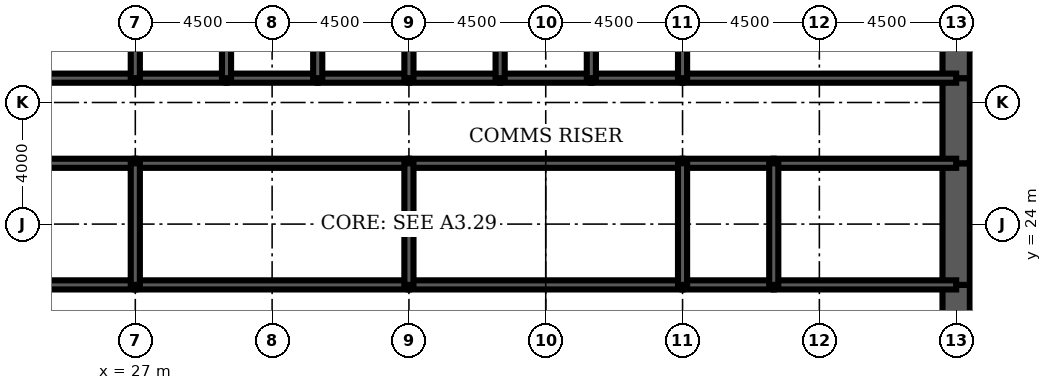
"""IFC4 building model, lengths in metres.
Left out: names, types, materials, properties, quantities, classifications, styles, units other than length and angle.
Written with IfcOpenShell. Run it as: python <this file> out.ifc"""

import sys

from ifc_helpers import new_model, si_unit, direction, frame, frame_2d, origin, place, context, subcontext, project, spatial, rectangle, extrude, element, fill, save


model = new_model("IFC4")
c1 = context("Model", 3, precision=1e-05, world=origin(), true_north=direction((0.0, 1.0)))
c2 = subcontext(c1, "Body", "Model", "MODEL_VIEW")
j1 = project(units=[si_unit("LENGTHUNIT", "METRE"), si_unit("PLANEANGLEUNIT", "RADIAN")], contexts=[c1])
p1 = place(None, origin())
s1 = spatial("IfcSite", under=j1, at=p1, CompositionType="ELEMENT")
p2 = place(p1, origin())
s2 = spatial("IfcBuilding", under=s1, at=p2, CompositionType="ELEMENT")
p3 = place(p2, frame((0.0, 0.0, 125.7)))
s3 = spatial("IfcBuildingStorey", under=s2, at=p3, CompositionType="ELEMENT", Elevation=125.7)
p4 = place(p3, frame((54.0, 19.2, 0.0), z_axis=(0.0, 0.0, 1.0), x_axis=(0.0, 1.0, 0.0)))
e1 = element("IfcWall", 1, at=p4, inside=s3, PredefinedType="SHEAR", context=c2, shape_type="SweptSolid", body=[
    extrude(rectangle(XDim=2.8, YDim=0.9, at=frame_2d((1.4, 0.0))), origin(), (0.0, 0.0, 1.0), 4.2),
])
p5 = place(p4, frame((0.4, 0.0, 0.0)))
e2 = element("IfcOpeningElement", 2, at=p5, cuts=e1, PredefinedType="OPENING", context=c2, shape_type="SweptSolid", body=[
    extrude(rectangle(XDim=1.8, YDim=2.1, at=frame_2d((0.9, 1.05))), frame((0.0, 0.46, 0.0), z_axis=(0.0, -1.0, 0.0), x_axis=(1.0, 0.0, 0.0)), (0.0, 0.0, 1.0), 0.92),
])
p6 = place(p3, frame((54.0, 22.0, 0.0), z_axis=(0.0, 0.0, 1.0), x_axis=(0.0, 1.0, 0.0)))
e3 = element("IfcWall", 3, at=p6, inside=s3, PredefinedType="SHEAR", context=c2, shape_type="SweptSolid", body=[
    extrude(rectangle(XDim=4.0, YDim=0.9, at=frame_2d((2.0, 0.0))), origin(), (0.0, 0.0, 1.0), 4.2),
])
p7 = place(p3, frame((54.0, 26.0, 0.0), z_axis=(0.0, 0.0, 1.0), x_axis=(0.0, 1.0, 0.0)))
e4 = element("IfcWall", 4, at=p7, inside=s3, PredefinedType="SHEAR", context=c2, shape_type="SweptSolid", body=[
    extrude(rectangle(XDim=2.8, YDim=0.9, at=frame_2d((1.4, 0.0))), origin(), (0.0, 0.0, 1.0), 4.2),
])
p8 = place(p7, frame((0.6, 0.0, 0.0)))
e5 = element("IfcOpeningElement", 5, at=p8, cuts=e4, PredefinedType="OPENING", context=c2, shape_type="SweptSolid", body=[
    extrude(rectangle(XDim=1.8, YDim=2.1, at=frame_2d((0.9, 1.05))), frame((0.0, 0.46, 0.0), z_axis=(0.0, -1.0, 0.0), x_axis=(1.0, 0.0, 0.0)), (0.0, 0.0, 1.0), 0.92),
])
p9 = place(p3, frame((54.0, 28.8, 0.0), z_axis=(0.0, 0.0, 1.0), x_axis=(0.0, 1.0, 0.0)))
e6 = element("IfcWall", 6, at=p9, inside=s3, PredefinedType="SHEAR", context=c2, shape_type="SweptSolid", body=[
    extrude(rectangle(XDim=3.2, YDim=0.9, at=frame_2d((1.6, 0.0))), origin(), (0.0, 0.0, 1.0), 4.2),
])
p10 = place(p3, frame((18.0, 28.8, 0.0), z_axis=(0.0, 0.0, 1.0), x_axis=(1.0, 0.0, 0.0)))
e7 = element("IfcWall", 7, at=p10, inside=s3, PredefinedType="SOLIDWALL", context=c2, shape_type="SweptSolid", body=[
    extrude(rectangle(XDim=9.0, YDim=0.3, at=frame_2d((4.5, 0.0))), origin(), (0.0, 0.0, 1.0), 4.2),
])
p11 = place(p10, frame((0.65, 0.0, 0.0)))
e8 = element("IfcOpeningElement", 8, at=p11, cuts=e7, PredefinedType="OPENING", context=c2, shape_type="SweptSolid", body=[
    extrude(rectangle(XDim=1.0, YDim=2.1, at=frame_2d((0.5, 1.05))), frame((0.0, 0.16, 0.0), z_axis=(0.0, -1.0, 0.0), x_axis=(1.0, 0.0, 0.0)), (0.0, 0.0, 1.0), 0.32),
])
p12 = place(p3, frame((27.0, 28.8, 0.0), z_axis=(0.0, 0.0, 1.0), x_axis=(1.0, 0.0, 0.0)))
e9 = element("IfcWall", 9, at=p12, inside=s3, PredefinedType="SOLIDWALL", context=c2, shape_type="SweptSolid", body=[
    extrude(rectangle(XDim=3.0, YDim=0.3, at=frame_2d((1.5, 0.0))), origin(), (0.0, 0.0, 1.0), 4.2),
])
p13 = place(p12, frame((0.95, 0.0, 0.0)))
e10 = element("IfcOpeningElement", 10, at=p13, cuts=e9, PredefinedType="OPENING", context=c2, shape_type="SweptSolid", body=[
    extrude(rectangle(XDim=1.1, YDim=2.2, at=frame_2d((0.55, 1.1))), frame((0.0, 0.16, 0.0), z_axis=(0.0, -1.0, 0.0), x_axis=(1.0, 0.0, 0.0)), (0.0, 0.0, 1.0), 0.32),
])
p14 = place(p3, frame((30.0, 28.8, 0.0), z_axis=(0.0, 0.0, 1.0), x_axis=(1.0, 0.0, 0.0)))
e11 = element("IfcWall", 11, at=p14, inside=s3, PredefinedType="SOLIDWALL", context=c2, shape_type="SweptSolid", body=[
    extrude(rectangle(XDim=3.0, YDim=0.3, at=frame_2d((1.5, 0.0))), origin(), (0.0, 0.0, 1.0), 4.2),
])
p15 = place(p14, frame((0.95, 0.0, 0.0)))
e12 = element("IfcOpeningElement", 12, at=p15, cuts=e11, PredefinedType="OPENING", context=c2, shape_type="SweptSolid", body=[
    extrude(rectangle(XDim=1.1, YDim=2.2, at=frame_2d((0.55, 1.1))), frame((0.0, 0.16, 0.0), z_axis=(0.0, -1.0, 0.0), x_axis=(1.0, 0.0, 0.0)), (0.0, 0.0, 1.0), 0.32),
])
p16 = place(p3, frame((33.0, 28.8, 0.0), z_axis=(0.0, 0.0, 1.0), x_axis=(1.0, 0.0, 0.0)))
e13 = element("IfcWall", 13, at=p16, inside=s3, PredefinedType="SOLIDWALL", context=c2, shape_type="SweptSolid", body=[
    extrude(rectangle(XDim=3.0, YDim=0.3, at=frame_2d((1.5, 0.0))), origin(), (0.0, 0.0, 1.0), 4.2),
])
p17 = place(p16, frame((0.95, 0.0, 0.0)))
e14 = element("IfcOpeningElement", 14, at=p17, cuts=e13, PredefinedType="OPENING", context=c2, shape_type="SweptSolid", body=[
    extrude(rectangle(XDim=1.1, YDim=2.2, at=frame_2d((0.55, 1.1))), frame((0.0, 0.16, 0.0), z_axis=(0.0, -1.0, 0.0), x_axis=(1.0, 0.0, 0.0)), (0.0, 0.0, 1.0), 0.32),
])
for number, where, z_axis, x_axis in (
    (15, (36.0, 28.8, 0.0), (0.0, 0.0, 1.0), (1.0, 0.0, 0.0)),
    (16, (39.0, 28.8, 0.0), (0.0, 0.0, 1.0), (1.0, 0.0, 0.0)),
):
    element("IfcWall", number, at=place(p3, frame(where, z_axis=z_axis, x_axis=x_axis)), inside=s3, PredefinedType="SOLIDWALL", context=c2, shape_type="SweptSolid", body=[
        extrude(rectangle(XDim=3.0, YDim=0.3, at=frame_2d((1.5, 0.0))), origin(), (0.0, 0.0, 1.0), 4.2),
    ])
p18 = place(p3, frame((42.0, 28.8, 0.0), z_axis=(0.0, 0.0, 1.0), x_axis=(1.0, 0.0, 0.0)))
e17 = element("IfcWall", 17, at=p18, inside=s3, PredefinedType="SOLIDWALL", context=c2, shape_type="SweptSolid", body=[
    extrude(rectangle(XDim=3.0, YDim=0.3, at=frame_2d((1.5, 0.0))), origin(), (0.0, 0.0, 1.0), 4.2),
])
p19 = place(p18, frame((0.95, 0.0, 0.0)))
e18 = element("IfcOpeningElement", 18, at=p19, cuts=e17, PredefinedType="OPENING", context=c2, shape_type="SweptSolid", body=[
    extrude(rectangle(XDim=1.1, YDim=2.2, at=frame_2d((0.55, 1.1))), frame((0.0, 0.16, 0.0), z_axis=(0.0, -1.0, 0.0), x_axis=(1.0, 0.0, 0.0)), (0.0, 0.0, 1.0), 0.32),
])
p20 = place(p3, frame((45.0, 28.8, 0.0), z_axis=(0.0, 0.0, 1.0), x_axis=(1.0, 0.0, 0.0)))
e19 = element("IfcWall", 19, at=p20, inside=s3, PredefinedType="SOLIDWALL", context=c2, shape_type="SweptSolid", body=[
    extrude(rectangle(XDim=9.0, YDim=0.3, at=frame_2d((4.5, 0.0))), origin(), (0.0, 0.0, 1.0), 4.2),
])
p21 = place(p20, frame((7.35, 0.0, 0.0)))
e20 = element("IfcOpeningElement", 20, at=p21, cuts=e19, PredefinedType="OPENING", context=c2, shape_type="SweptSolid", body=[
    extrude(rectangle(XDim=1.0, YDim=2.1, at=frame_2d((0.5, 1.05))), frame((0.0, 0.16, 0.0), z_axis=(0.0, -1.0, 0.0), x_axis=(1.0, 0.0, 0.0)), (0.0, 0.0, 1.0), 0.32),
])
p22 = place(p3, frame((24.0, 22.0, 0.0), z_axis=(0.0, 0.0, 1.0), x_axis=(1.0, 0.0, 0.0)))
e21 = element("IfcWall", 21, at=p22, inside=s3, PredefinedType="SOLIDWALL", context=c2, shape_type="SweptSolid", body=[
    extrude(rectangle(XDim=3.0, YDim=0.3, at=frame_2d((1.5, 0.0))), origin(), (0.0, 0.0, 1.0), 4.2),
])
p23 = place(p22, frame((1.0, 0.0, 0.0)))
e22 = element("IfcOpeningElement", 22, at=p23, cuts=e21, PredefinedType="OPENING", context=c2, shape_type="SweptSolid", body=[
    extrude(rectangle(XDim=1.0, YDim=2.1, at=frame_2d((0.5, 1.05))), frame((0.0, 0.16, 0.0), z_axis=(0.0, -1.0, 0.0), x_axis=(1.0, 0.0, 0.0)), (0.0, 0.0, 1.0), 0.32),
])
p24 = place(p3, frame((27.0, 22.0, 0.0), z_axis=(0.0, 0.0, 1.0), x_axis=(1.0, 0.0, 0.0)))
e23 = element("IfcWall", 23, at=p24, inside=s3, PredefinedType="SOLIDWALL", context=c2, shape_type="SweptSolid", body=[
    extrude(rectangle(XDim=9.0, YDim=0.3, at=frame_2d((4.5, 0.0))), origin(), (0.0, 0.0, 1.0), 4.2),
])
p25 = place(p24, frame((4.0, 0.0, 0.0)))
e24 = element("IfcOpeningElement", 24, at=p25, cuts=e23, PredefinedType="OPENING", context=c2, shape_type="SweptSolid", body=[
    extrude(rectangle(XDim=1.0, YDim=2.1, at=frame_2d((0.5, 1.05))), frame((0.0, 0.16, 0.0), z_axis=(0.0, -1.0, 0.0), x_axis=(1.0, 0.0, 0.0)), (0.0, 0.0, 1.0), 0.32),
])
p26 = place(p3, frame((36.0, 22.0, 0.0), z_axis=(0.0, 0.0, 1.0), x_axis=(1.0, 0.0, 0.0)))
e25 = element("IfcWall", 25, at=p26, inside=s3, PredefinedType="SOLIDWALL", context=c2, shape_type="SweptSolid", body=[
    extrude(rectangle(XDim=9.0, YDim=0.3, at=frame_2d((4.5, 0.0))), origin(), (0.0, 0.0, 1.0), 4.2),
])
p27 = place(p26, frame((4.0, 0.0, 0.0)))
e26 = element("IfcOpeningElement", 26, at=p27, cuts=e25, PredefinedType="OPENING", context=c2, shape_type="SweptSolid", body=[
    extrude(rectangle(XDim=1.0, YDim=2.1, at=frame_2d((0.5, 1.05))), frame((0.0, 0.16, 0.0), z_axis=(0.0, -1.0, 0.0), x_axis=(1.0, 0.0, 0.0)), (0.0, 0.0, 1.0), 0.32),
])
p28 = place(p3, frame((45.0, 22.0, 0.0), z_axis=(0.0, 0.0, 1.0), x_axis=(1.0, 0.0, 0.0)))
e27 = element("IfcWall", 27, at=p28, inside=s3, PredefinedType="SOLIDWALL", context=c2, shape_type="SweptSolid", body=[
    extrude(rectangle(XDim=3.0, YDim=0.3, at=frame_2d((1.5, 0.0))), origin(), (0.0, 0.0, 1.0), 4.2),
])
p29 = place(p28, frame((1.0, 0.0, 0.0)))
e28 = element("IfcOpeningElement", 28, at=p29, cuts=e27, PredefinedType="OPENING", context=c2, shape_type="SweptSolid", body=[
    extrude(rectangle(XDim=1.0, YDim=2.1, at=frame_2d((0.5, 1.05))), frame((0.0, 0.16, 0.0), z_axis=(0.0, -1.0, 0.0), x_axis=(1.0, 0.0, 0.0)), (0.0, 0.0, 1.0), 0.32),
])
p30 = place(p3, frame((48.0, 22.0, 0.0), z_axis=(0.0, 0.0, 1.0), x_axis=(1.0, 0.0, 0.0)))
e29 = element("IfcWall", 29, at=p30, inside=s3, PredefinedType="SOLIDWALL", context=c2, shape_type="SweptSolid", body=[
    extrude(rectangle(XDim=6.0, YDim=0.3, at=frame_2d((3.0, 0.0))), origin(), (0.0, 0.0, 1.0), 4.2),
])
p31 = place(p30, frame((2.0, 0.0, 0.0)))
e30 = element("IfcOpeningElement", 30, at=p31, cuts=e29, PredefinedType="OPENING", context=c2, shape_type="SweptSolid", body=[
    extrude(rectangle(XDim=1.0, YDim=2.1, at=frame_2d((0.5, 1.05))), frame((0.0, 0.16, 0.0), z_axis=(0.0, -1.0, 0.0), x_axis=(1.0, 0.0, 0.0)), (0.0, 0.0, 1.0), 0.32),
])
p32 = place(p30, frame((4.3, 0.0, 0.0)))
e31 = element("IfcOpeningElement", 31, at=p32, cuts=e29, PredefinedType="OPENING", context=c2, shape_type="SweptSolid", body=[
    extrude(rectangle(XDim=1.0, YDim=2.1, at=frame_2d((0.5, 1.05))), frame((0.0, 0.16, 0.0), z_axis=(0.0, -1.0, 0.0), x_axis=(1.0, 0.0, 0.0)), (0.0, 0.0, 1.0), 0.32),
])
p33 = place(p3, frame((24.0, 26.0, 0.0), z_axis=(0.0, 0.0, 1.0), x_axis=(1.0, 0.0, 0.0)))
e32 = element("IfcWall", 32, at=p33, inside=s3, PredefinedType="SOLIDWALL", context=c2, shape_type="SweptSolid", body=[
    extrude(rectangle(XDim=3.0, YDim=0.3, at=frame_2d((1.5, 0.0))), origin(), (0.0, 0.0, 1.0), 4.2),
])
for number, where, z_axis, x_axis in (
    (33, (27.0, 26.0, 0.0), (0.0, 0.0, 1.0), (1.0, 0.0, 0.0)),
    (34, (36.0, 26.0, 0.0), (0.0, 0.0, 1.0), (1.0, 0.0, 0.0)),
):
    element("IfcWall", number, at=place(p3, frame(where, z_axis=z_axis, x_axis=x_axis)), inside=s3, PredefinedType="SOLIDWALL", context=c2, shape_type="SweptSolid", body=[
        extrude(rectangle(XDim=9.0, YDim=0.3, at=frame_2d((4.5, 0.0))), origin(), (0.0, 0.0, 1.0), 4.2),
    ])
p34 = place(p3, frame((45.0, 26.0, 0.0), z_axis=(0.0, 0.0, 1.0), x_axis=(1.0, 0.0, 0.0)))
e35 = element("IfcWall", 35, at=p34, inside=s3, PredefinedType="SOLIDWALL", context=c2, shape_type="SweptSolid", body=[
    extrude(rectangle(XDim=3.0, YDim=0.3, at=frame_2d((1.5, 0.0))), origin(), (0.0, 0.0, 1.0), 4.2),
])
p35 = place(p3, frame((48.0, 26.0, 0.0), z_axis=(0.0, 0.0, 1.0), x_axis=(1.0, 0.0, 0.0)))
e36 = element("IfcWall", 36, at=p35, inside=s3, PredefinedType="SOLIDWALL", context=c2, shape_type="SweptSolid", body=[
    extrude(rectangle(XDim=6.0, YDim=0.3, at=frame_2d((3.0, 0.0))), origin(), (0.0, 0.0, 1.0), 4.2),
])
for number, where, z_axis, x_axis in (
    (37, (27.0, 28.8, 0.0), (0.0, 0.0, 1.0), (0.0, 1.0, 0.0)),
    (38, (30.0, 28.8, 0.0), (0.0, 0.0, 1.0), (0.0, 1.0, 0.0)),
    (39, (33.0, 28.8, 0.0), (0.0, 0.0, 1.0), (0.0, 1.0, 0.0)),
    (40, (36.0, 28.8, 0.0), (0.0, 0.0, 1.0), (0.0, 1.0, 0.0)),
    (41, (39.0, 28.8, 0.0), (0.0, 0.0, 1.0), (0.0, 1.0, 0.0)),
    (42, (42.0, 28.8, 0.0), (0.0, 0.0, 1.0), (0.0, 1.0, 0.0)),
    (43, (45.0, 28.8, 0.0), (0.0, 0.0, 1.0), (0.0, 1.0, 0.0)),
):
    element("IfcWall", number, at=place(p3, frame(where, z_axis=z_axis, x_axis=x_axis)), inside=s3, PredefinedType="SOLIDWALL", context=c2, shape_type="SweptSolid", body=[
        extrude(rectangle(XDim=3.2, YDim=0.3, at=frame_2d((1.6, 0.0))), origin(), (0.0, 0.0, 1.0), 4.2),
    ])
for number, where, z_axis, x_axis in (
    (44, (27.0, 22.0, 0.0), (0.0, 0.0, 1.0), (0.0, 1.0, 0.0)),
    (45, (36.0, 22.0, 0.0), (0.0, 0.0, 1.0), (0.0, 1.0, 0.0)),
    (46, (45.0, 22.0, 0.0), (0.0, 0.0, 1.0), (0.0, 1.0, 0.0)),
    (47, (48.0, 22.0, 0.0), (0.0, 0.0, 1.0), (0.0, 1.0, 0.0)),
):
    element("IfcWall", number, at=place(p3, frame(where, z_axis=z_axis, x_axis=x_axis)), inside=s3, PredefinedType="SOLIDWALL", context=c2, shape_type="SweptSolid", body=[
        extrude(rectangle(XDim=4.0, YDim=0.3, at=frame_2d((2.0, 0.0))), origin(), (0.0, 0.0, 1.0), 4.2),
    ])
p36 = place(p3, frame((42.5, 22.15, 0.0), z_axis=(0.0, 0.0, 1.0), x_axis=(0.0, 1.0, 0.0)))
e48 = element("IfcWall", 48, at=p36, inside=s3, PredefinedType="PARTITIONING", context=c2, shape_type="SweptSolid", body=[
    extrude(rectangle(XDim=3.7, YDim=0.15, at=frame_2d((1.85, 0.0))), origin(), (0.0, 0.0, 1.0), 3.0),
])
p37 = place(p36, frame((2.2, 0.0, 0.0)))
e49 = element("IfcOpeningElement", 49, at=p37, cuts=e48, PredefinedType="OPENING", context=c2, shape_type="SweptSolid", body=[
    extrude(rectangle(XDim=1.0, YDim=2.1, at=frame_2d((0.5, 1.05))), frame((0.0, 0.085, 0.0), z_axis=(0.0, -1.0, 0.0), x_axis=(1.0, 0.0, 0.0)), (0.0, 0.0, 1.0), 0.17),
])
p38 = place(p3, frame((51.975, 22.15, 0.0), z_axis=(0.0, 0.0, 1.0), x_axis=(0.0, 1.0, 0.0)))
e50 = element("IfcWall", 50, at=p38, inside=s3, PredefinedType="PARTITIONING", context=c2, shape_type="SweptSolid", body=[
    extrude(rectangle(XDim=3.7, YDim=0.15, at=frame_2d((1.85, 0.0))), origin(), (0.0, 0.0, 1.0), 3.0),
])
p39 = place(p3, frame((25.2, 26.15, 0.0), z_axis=(0.0, 0.0, 1.0), x_axis=(0.0, 1.0, 0.0)))
e51 = element("IfcWall", 51, at=p39, inside=s3, PredefinedType="PARTITIONING", context=c2, shape_type="SweptSolid", body=[
    extrude(rectangle(XDim=2.5, YDim=0.15, at=frame_2d((1.25, 0.0))), origin(), (0.0, 0.0, 1.0), 3.0),
])
p40 = place(p39, frame((0.35, 0.0, 0.0)))
e52 = element("IfcOpeningElement", 52, at=p40, cuts=e51, PredefinedType="OPENING", context=c2, shape_type="SweptSolid", body=[
    extrude(rectangle(XDim=1.0, YDim=2.1, at=frame_2d((0.5, 1.05))), frame((0.0, 0.085, 0.0), z_axis=(0.0, -1.0, 0.0), x_axis=(1.0, 0.0, 0.0)), (0.0, 0.0, 1.0), 0.17),
])
p41 = place(p37, origin())
e53 = element("IfcDoor", 53, at=p41, inside=s3, OperationType="SINGLE_SWING_RIGHT", PredefinedType="DOOR", context=c2, shape_type="SweptSolid", body=[
    extrude(rectangle(XDim=1.0, YDim=2.1, at=frame_2d((0.5, 1.05))), frame((0.0, 0.025, 0.0), z_axis=(0.0, -1.0, 0.0), x_axis=(1.0, 0.0, 0.0)), (0.0, 0.0, 1.0), 0.05),
])
fill(e49, e53)
p42 = place(p40, origin())
e54 = element("IfcDoor", 54, at=p42, inside=s3, OperationType="SINGLE_SWING_LEFT", PredefinedType="DOOR", context=c2, shape_type="SweptSolid", body=[
    extrude(rectangle(XDim=1.0, YDim=2.1, at=frame_2d((0.5, 1.05))), frame((0.0, 0.025, 0.0), z_axis=(0.0, -1.0, 0.0), x_axis=(1.0, 0.0, 0.0)), (0.0, 0.0, 1.0), 0.05),
])
fill(e52, e54)
p43 = place(p19, origin())
e55 = element("IfcDoor", 55, at=p43, inside=s3, OperationType="DOUBLE_DOOR_SLIDING", PredefinedType="USERDEFINED", context=c2, shape_type="SweptSolid", body=[
    extrude(rectangle(XDim=1.1, YDim=2.2, at=frame_2d((0.55, 1.1))), frame((0.0, 0.025, 0.0), z_axis=(0.0, -1.0, 0.0), x_axis=(1.0, 0.0, 0.0)), (0.0, 0.0, 1.0), 0.05),
])
fill(e18, e55)
p44 = place(p13, origin())
e56 = element("IfcDoor", 56, at=p44, inside=s3, OperationType="DOUBLE_DOOR_SLIDING", PredefinedType="USERDEFINED", context=c2, shape_type="SweptSolid", body=[
    extrude(rectangle(XDim=1.1, YDim=2.2, at=frame_2d((0.55, 1.1))), frame((0.0, 0.025, 0.0), z_axis=(0.0, -1.0, 0.0), x_axis=(1.0, 0.0, 0.0)), (0.0, 0.0, 1.0), 0.05),
])
fill(e10, e56)
p45 = place(p15, origin())
e57 = element("IfcDoor", 57, at=p45, inside=s3, OperationType="DOUBLE_DOOR_SLIDING", PredefinedType="USERDEFINED", context=c2, shape_type="SweptSolid", body=[
    extrude(rectangle(XDim=1.1, YDim=2.2, at=frame_2d((0.55, 1.1))), frame((0.0, 0.025, 0.0), z_axis=(0.0, -1.0, 0.0), x_axis=(1.0, 0.0, 0.0)), (0.0, 0.0, 1.0), 0.05),
])
fill(e12, e57)
p46 = place(p17, origin())
e58 = element("IfcDoor", 58, at=p46, inside=s3, OperationType="DOUBLE_DOOR_SLIDING", PredefinedType="USERDEFINED", context=c2, shape_type="SweptSolid", body=[
    extrude(rectangle(XDim=1.1, YDim=2.2, at=frame_2d((0.55, 1.1))), frame((0.0, 0.025, 0.0), z_axis=(0.0, -1.0, 0.0), x_axis=(1.0, 0.0, 0.0)), (0.0, 0.0, 1.0), 0.05),
])
fill(e14, e58)
p47 = place(p21, origin())
e59 = element("IfcDoor", 59, at=p47, inside=s3, OperationType="SINGLE_SWING_RIGHT", PredefinedType="DOOR", context=c2, shape_type="SweptSolid", body=[
    extrude(rectangle(XDim=1.0, YDim=2.1, at=frame_2d((0.5, 1.05))), frame((0.0, 0.025, 0.0), z_axis=(0.0, -1.0, 0.0), x_axis=(1.0, 0.0, 0.0)), (0.0, 0.0, 1.0), 0.05),
])
fill(e20, e59)
p48 = place(p5, origin())
e60 = element("IfcDoor", 60, at=p48, inside=s3, OperationType="SINGLE_SWING_LEFT", PredefinedType="DOOR", context=c2, shape_type="SweptSolid", body=[
    extrude(rectangle(XDim=1.8, YDim=2.1, at=frame_2d((0.9, 1.05))), frame((0.0, 0.45, 0.0), z_axis=(0.0, -1.0, 0.0), x_axis=(1.0, 0.0, 0.0)), (0.0, 0.0, 1.0), 0.899),
])
fill(e2, e60)
p49 = place(p8, origin())
e61 = element("IfcDoor", 61, at=p49, inside=s3, OperationType="SINGLE_SWING_LEFT", PredefinedType="DOOR", context=c2, shape_type="SweptSolid", body=[
    extrude(rectangle(XDim=1.8, YDim=2.1, at=frame_2d((0.9, 1.05))), frame((0.0, 0.45, 0.0), z_axis=(0.0, -1.0, 0.0), x_axis=(1.0, 0.0, 0.0)), (0.0, 0.0, 1.0), 0.899),
])
fill(e5, e61)
p50 = place(p23, origin())
e62 = element("IfcDoor", 62, at=p50, inside=s3, OperationType="SINGLE_SWING_LEFT", PredefinedType="DOOR", context=c2, shape_type="SweptSolid", body=[
    extrude(rectangle(XDim=1.0, YDim=2.1, at=frame_2d((0.5, 1.05))), frame((0.0, 0.025, 0.0), z_axis=(0.0, -1.0, 0.0), x_axis=(1.0, 0.0, 0.0)), (0.0, 0.0, 1.0), 0.05),
])
fill(e22, e62)
p51 = place(p25, origin())
e63 = element("IfcDoor", 63, at=p51, inside=s3, OperationType="SINGLE_SWING_LEFT", PredefinedType="DOOR", context=c2, shape_type="SweptSolid", body=[
    extrude(rectangle(XDim=1.0, YDim=2.1, at=frame_2d((0.5, 1.05))), frame((0.0, 0.025, 0.0), z_axis=(0.0, -1.0, 0.0), x_axis=(1.0, 0.0, 0.0)), (0.0, 0.0, 1.0), 0.05),
])
fill(e24, e63)
p52 = place(p27, origin())
e64 = element("IfcDoor", 64, at=p52, inside=s3, OperationType="SINGLE_SWING_LEFT", PredefinedType="DOOR", context=c2, shape_type="SweptSolid", body=[
    extrude(rectangle(XDim=1.0, YDim=2.1, at=frame_2d((0.5, 1.05))), frame((0.0, 0.025, 0.0), z_axis=(0.0, -1.0, 0.0), x_axis=(1.0, 0.0, 0.0)), (0.0, 0.0, 1.0), 0.05),
])
fill(e26, e64)
p53 = place(p29, origin())
e65 = element("IfcDoor", 65, at=p53, inside=s3, OperationType="SINGLE_SWING_LEFT", PredefinedType="DOOR", context=c2, shape_type="SweptSolid", body=[
    extrude(rectangle(XDim=1.0, YDim=2.1, at=frame_2d((0.5, 1.05))), frame((0.0, 0.025, 0.0), z_axis=(0.0, -1.0, 0.0), x_axis=(1.0, 0.0, 0.0)), (0.0, 0.0, 1.0), 0.05),
])
fill(e28, e65)
p54 = place(p31, origin())
e66 = element("IfcDoor", 66, at=p54, inside=s3, OperationType="SINGLE_SWING_LEFT", PredefinedType="DOOR", context=c2, shape_type="SweptSolid", body=[
    extrude(rectangle(XDim=1.0, YDim=2.1, at=frame_2d((0.5, 1.05))), frame((0.0, 0.025, 0.0), z_axis=(0.0, -1.0, 0.0), x_axis=(1.0, 0.0, 0.0)), (0.0, 0.0, 1.0), 0.05),
])
fill(e30, e66)
p55 = place(p32, origin())
e67 = element("IfcDoor", 67, at=p55, inside=s3, OperationType="SINGLE_SWING_RIGHT", PredefinedType="DOOR", context=c2, shape_type="SweptSolid", body=[
    extrude(rectangle(XDim=1.0, YDim=2.1, at=frame_2d((0.5, 1.05))), frame((0.0, 0.025, 0.0), z_axis=(0.0, -1.0, 0.0), x_axis=(1.0, 0.0, 0.0)), (0.0, 0.0, 1.0), 0.05),
])
fill(e31, e67)
save(model, sys.argv[1])
